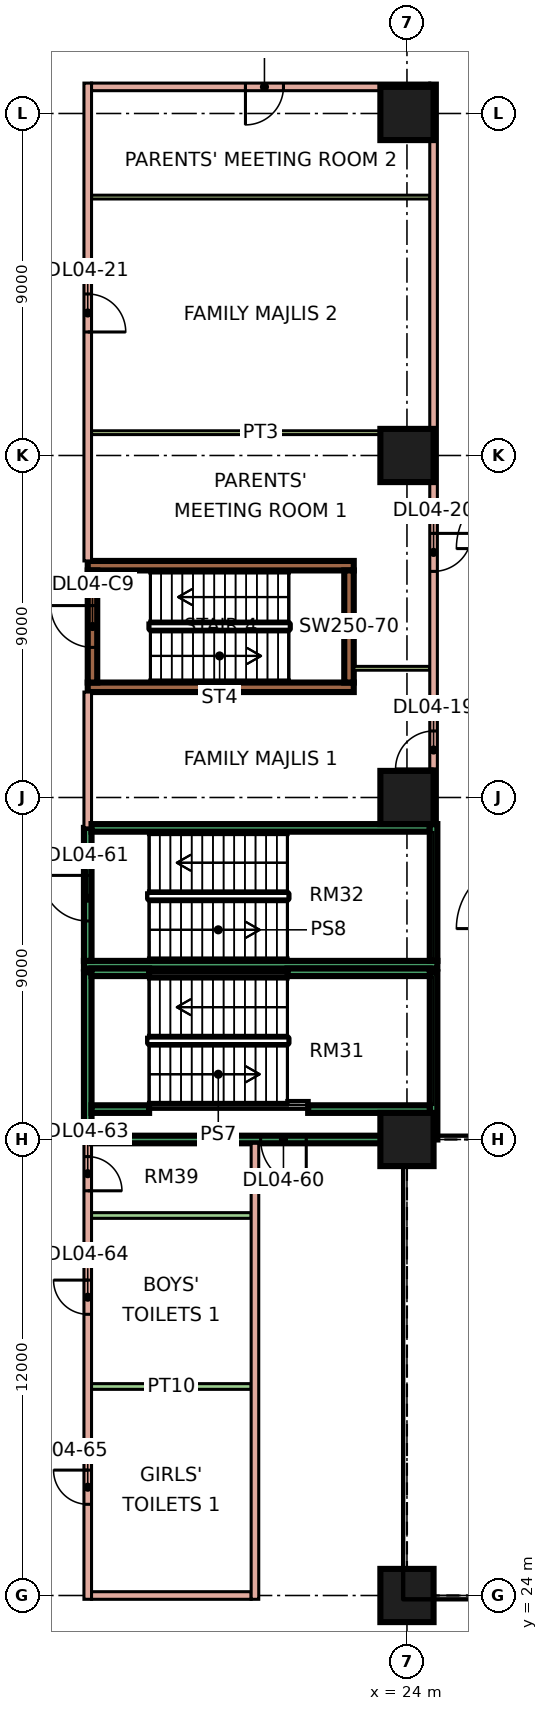
"""IFC4 building model, lengths in metres.
Left out: names, types, materials, properties, quantities, classifications, styles, units other than length and angle.
Written with IfcOpenShell. Run it as: python <this file> out.ifc"""

import sys

from ifc_helpers import new_model, si_unit, direction, frame, frame_2d, origin, origin_2d, place, context, subcontext, project, spatial, rectangle, extrude, element, fill, save


model = new_model("IFC4")
c1 = context("Model", 3, precision=1e-05, world=origin(), true_north=direction((0.0, 1.0)))
c2 = subcontext(c1, "Body", "Model", "MODEL_VIEW")
j1 = project(units=[si_unit("LENGTHUNIT", "METRE"), si_unit("PLANEANGLEUNIT", "RADIAN")], contexts=[c1])
p1 = place(None, origin())
s1 = spatial("IfcSite", under=j1, at=p1, CompositionType="ELEMENT")
p2 = place(p1, origin())
s2 = spatial("IfcBuilding", under=s1, at=p2, CompositionType="ELEMENT")
p3 = place(p2, frame((0.0, 0.0, 21.6)))
s3 = spatial("IfcBuildingStorey", under=s2, at=p3, CompositionType="ELEMENT", Elevation=21.6)
for number, where, z_axis, x_axis in (
    (1, (24.0, 24.0, 0.0), (0.0, 0.0, 1.0), (1.0, 0.0, 0.0)),
    (2, (24.0, 36.0, 0.0), (0.0, 0.0, 1.0), (1.0, 0.0, 0.0)),
    (3, (24.0, 45.0, 0.0), (0.0, 0.0, 1.0), (1.0, 0.0, 0.0)),
    (4, (24.0, 54.0, 0.0), (0.0, 0.0, 1.0), (1.0, 0.0, 0.0)),
    (5, (24.0, 63.0, 0.0), (0.0, 0.0, 1.0), (1.0, 0.0, 0.0)),
):
    element("IfcColumn", number, at=place(p3, frame(where, z_axis=z_axis, x_axis=x_axis)), inside=s3, PredefinedType="COLUMN", context=c2, shape_type="SweptSolid", body=[
        extrude(rectangle(XDim=1.4, YDim=1.4, at=origin_2d()), origin(), (0.0, 0.0, 1.0), 4.8),
    ])
for number, where, z_axis, x_axis in (
    (6, (15.6, 47.9, 0.0), (0.0, 0.0, 1.0), (1.0, 0.0, 0.0)),
    (7, (15.6, 51.1, 0.0), (0.0, 0.0, 1.0), (1.0, 0.0, 0.0)),
):
    element("IfcWall", number, at=place(p3, frame(where, z_axis=z_axis, x_axis=x_axis)), inside=s3, PredefinedType="SHEAR", context=c2, shape_type="SweptSolid", body=[
        extrude(rectangle(XDim=7.0, YDim=0.25, at=frame_2d((3.5, 0.0))), origin(), (0.0, 0.0, 1.0), 4.8),
    ])
p4 = place(p3, frame((15.725, 48.025, 0.0), z_axis=(0.0, 0.0, 1.0), x_axis=(0.0, 1.0, 0.0)))
e8 = element("IfcWall", 8, at=p4, inside=s3, PredefinedType="SHEAR", context=c2, shape_type="SweptSolid", body=[
    extrude(rectangle(XDim=2.95, YDim=0.25, at=frame_2d((1.475, 0.0))), origin(), (0.0, 0.0, 1.0), 4.8),
])
p5 = place(p4, frame((0.925, 0.0, 0.0)))
e9 = element("IfcOpeningElement", 9, at=p5, cuts=e8, PredefinedType="OPENING", context=c2, shape_type="SweptSolid", body=[
    extrude(rectangle(XDim=1.1, YDim=2.2, at=frame_2d((0.55, 1.1))), frame((0.0, 0.135, 0.0), z_axis=(0.0, -1.0, 0.0), x_axis=(1.0, 0.0, 0.0)), (0.0, 0.0, 1.0), 0.27),
])
p6 = place(p3, frame((22.475, 48.025, 0.0), z_axis=(0.0, 0.0, 1.0), x_axis=(0.0, 1.0, 0.0)))
e10 = element("IfcWall", 10, at=p6, inside=s3, PredefinedType="SHEAR", context=c2, shape_type="SweptSolid", body=[
    extrude(rectangle(XDim=2.95, YDim=0.25, at=frame_2d((1.475, 0.0))), origin(), (0.0, 0.0, 1.0), 4.8),
])
p7 = place(p3, frame((25.068, 70.7, 0.0), z_axis=(0.0, 0.0, 1.0), x_axis=(0.707106781187, -0.707106781187, 0.0)))
e11 = element("IfcWall", 11, at=p7, inside=s3, PredefinedType="PARAPET", context=c2, shape_type="SweptSolid", body=[
    extrude(rectangle(XDim=9.379, YDim=0.2, at=frame_2d((4.689, 0.0))), origin(), (0.0, 0.0, 1.0), 0.5),
])
p8 = place(p3, frame((15.5, 40.6, 0.0), z_axis=(0.0, 0.0, 1.0), x_axis=(1.0, 0.0, 0.0)))
e12 = element("IfcWall", 12, at=p8, inside=s3, PredefinedType="SOLIDWALL", context=c2, shape_type="SweptSolid", body=[
    extrude(rectangle(XDim=9.3, YDim=0.2, at=frame_2d((4.65, 0.0))), origin(), (0.0, 0.0, 1.0), 4.4),
])
p9 = place(p3, frame((15.6, 23.9, 0.0), z_axis=(0.0, 0.0, 1.0), x_axis=(0.0, 1.0, 0.0)))
e13 = element("IfcWall", 13, at=p9, inside=s3, PredefinedType="PARTITIONING", context=c2, shape_type="SweptSolid", body=[
    extrude(rectangle(XDim=12.1, YDim=0.2, at=frame_2d((6.05, 0.0))), origin(), (0.0, 0.0, 1.0), 4.4),
])
p10 = place(p9, frame((10.75, 0.0, 0.0)))
e14 = element("IfcOpeningElement", 14, at=p10, cuts=e13, PredefinedType="OPENING", context=c2, shape_type="SweptSolid", body=[
    extrude(rectangle(XDim=0.9, YDim=2.1, at=frame_2d((0.45, 1.05))), frame((0.0, 0.11, 0.0), z_axis=(0.0, -1.0, 0.0), x_axis=(1.0, 0.0, 0.0)), (0.0, 0.0, 1.0), 0.22),
])
p11 = place(p9, frame((7.5, 0.0, 0.0)))
e15 = element("IfcOpeningElement", 15, at=p11, cuts=e13, PredefinedType="OPENING", context=c2, shape_type="SweptSolid", body=[
    extrude(rectangle(XDim=0.9, YDim=2.1, at=frame_2d((0.45, 1.05))), frame((0.0, 0.11, 0.0), z_axis=(0.0, -1.0, 0.0), x_axis=(1.0, 0.0, 0.0)), (0.0, 0.0, 1.0), 0.22),
])
p12 = place(p9, frame((2.5, 0.0, 0.0)))
e16 = element("IfcOpeningElement", 16, at=p12, cuts=e13, PredefinedType="OPENING", context=c2, shape_type="SweptSolid", body=[
    extrude(rectangle(XDim=0.9, YDim=2.1, at=frame_2d((0.45, 1.05))), frame((0.0, 0.11, 0.0), z_axis=(0.0, -1.0, 0.0), x_axis=(1.0, 0.0, 0.0)), (0.0, 0.0, 1.0), 0.22),
])
p13 = place(p3, frame((15.6, 36.0, 0.0), z_axis=(0.0, 0.0, 1.0), x_axis=(0.0, 1.0, 0.0)))
e17 = element("IfcWall", 17, at=p13, inside=s3, PredefinedType="SOLIDWALL", context=c2, shape_type="SweptSolid", body=[
    extrude(rectangle(XDim=4.4, YDim=0.2, at=frame_2d((2.2, 0.0))), origin(), (0.0, 0.0, 1.0), 4.4),
])
p14 = place(p3, frame((15.6, 40.7, 0.0), z_axis=(0.0, 0.0, 1.0), x_axis=(0.0, 1.0, 0.0)))
e18 = element("IfcWall", 18, at=p14, inside=s3, PredefinedType="SOLIDWALL", context=c2, shape_type="SweptSolid", body=[
    extrude(rectangle(XDim=3.5, YDim=0.2, at=frame_2d((1.75, 0.0))), origin(), (0.0, 0.0, 1.0), 4.4),
])
p15 = place(p14, frame((1.05, 0.0, 0.0)))
e19 = element("IfcOpeningElement", 19, at=p15, cuts=e18, PredefinedType="OPENING", context=c2, shape_type="SweptSolid", body=[
    extrude(rectangle(XDim=1.2, YDim=2.1, at=frame_2d((0.6, 1.05))), frame((0.0, 0.11, 0.0), z_axis=(0.0, -1.0, 0.0), x_axis=(1.0, 0.0, 0.0)), (0.0, 0.0, 1.0), 0.22),
])
p16 = place(p3, frame((15.6, 44.2, 0.0), z_axis=(0.0, 0.0, 1.0), x_axis=(0.0, 1.0, 0.0)))
e20 = element("IfcWall", 20, at=p16, inside=s3, PredefinedType="PARTITIONING", context=c2, shape_type="SweptSolid", body=[
    extrude(rectangle(XDim=3.575, YDim=0.2, at=frame_2d((1.788, 0.0))), origin(), (0.0, 0.0, 1.0), 4.4),
])
p17 = place(p3, frame((15.6, 51.225, 0.0), z_axis=(0.0, 0.0, 1.0), x_axis=(0.0, 1.0, 0.0)))
e21 = element("IfcWall", 21, at=p17, inside=s3, PredefinedType="PARTITIONING", context=c2, shape_type="SweptSolid", body=[
    extrude(rectangle(XDim=12.575, YDim=0.2, at=frame_2d((6.288, 0.0))), origin(), (0.0, 0.0, 1.0), 4.4),
])
p18 = place(p17, frame((6.025, 0.0, 0.0)))
e22 = element("IfcOpeningElement", 22, at=p18, cuts=e21, PredefinedType="OPENING", context=c2, shape_type="SweptSolid", body=[
    extrude(rectangle(XDim=1.0, YDim=2.1, at=frame_2d((0.5, 1.05))), frame((0.0, 0.11, 0.0), z_axis=(0.0, -1.0, 0.0), x_axis=(1.0, 0.0, 0.0)), (0.0, 0.0, 1.0), 0.22),
])
p19 = place(p3, frame((15.7, 24.0, 0.0), z_axis=(0.0, 0.0, 1.0), x_axis=(1.0, 0.0, 0.0)))
e23 = element("IfcWall", 23, at=p19, inside=s3, PredefinedType="PARTITIONING", context=c2, shape_type="SweptSolid", body=[
    extrude(rectangle(XDim=4.2, YDim=0.2, at=frame_2d((2.1, 0.0))), origin(), (0.0, 0.0, 1.0), 4.4),
])
for number, where, z_axis, x_axis in (
    (24, (15.7, 29.5, 0.0), (0.0, 0.0, 1.0), (1.0, 0.0, 0.0)),
    (25, (15.7, 34.0, 0.0), (0.0, 0.0, 1.0), (1.0, 0.0, 0.0)),
):
    element("IfcWall", number, at=place(p3, frame(where, z_axis=z_axis, x_axis=x_axis)), inside=s3, PredefinedType="PARTITIONING", context=c2, shape_type="SweptSolid", body=[
        extrude(rectangle(XDim=4.2, YDim=0.15, at=frame_2d((2.1, 0.0))), origin(), (0.0, 0.0, 1.0), 4.4),
    ])
p20 = place(p3, frame((15.7, 36.0, 0.0), z_axis=(0.0, 0.0, 1.0), x_axis=(1.0, 0.0, 0.0)))
e26 = element("IfcWall", 26, at=p20, inside=s3, PredefinedType="SOLIDWALL", context=c2, shape_type="SweptSolid", body=[
    extrude(rectangle(XDim=8.3, YDim=0.2, at=frame_2d((4.15, 0.0))), origin(), (0.0, 0.0, 1.0), 4.4),
])
p21 = place(p20, frame((4.45, 0.0, 0.0)))
e27 = element("IfcOpeningElement", 27, at=p21, cuts=e26, PredefinedType="OPENING", context=c2, shape_type="SweptSolid", body=[
    extrude(rectangle(XDim=1.2, YDim=2.1, at=frame_2d((0.6, 1.05))), frame((0.0, 0.11, 0.0), z_axis=(0.0, -1.0, 0.0), x_axis=(1.0, 0.0, 0.0)), (0.0, 0.0, 1.0), 0.22),
])
p22 = place(p3, frame((15.7, 44.2, 0.0), z_axis=(0.0, 0.0, 1.0), x_axis=(1.0, 0.0, 0.0)))
e28 = element("IfcWall", 28, at=p22, inside=s3, PredefinedType="SOLIDWALL", context=c2, shape_type="SweptSolid", body=[
    extrude(rectangle(XDim=8.9, YDim=0.2, at=frame_2d((4.45, 0.0))), origin(), (0.0, 0.0, 1.0), 4.4),
])
for number, where, z_axis, x_axis in (
    (29, (15.7, 54.6, 0.0), (0.0, 0.0, 1.0), (1.0, 0.0, 0.0)),
    (30, (15.7, 60.8, 0.0), (0.0, 0.0, 1.0), (1.0, 0.0, 0.0)),
):
    element("IfcWall", number, at=place(p3, frame(where, z_axis=z_axis, x_axis=x_axis)), inside=s3, PredefinedType="PARTITIONING", context=c2, shape_type="SweptSolid", body=[
        extrude(rectangle(XDim=8.9, YDim=0.1, at=frame_2d((4.45, 0.0))), origin(), (0.0, 0.0, 1.0), 4.4),
    ])
p23 = place(p3, frame((15.7, 63.7, 0.0), z_axis=(0.0, 0.0, 1.0), x_axis=(1.0, 0.0, 0.0)))
e31 = element("IfcWall", 31, at=p23, inside=s3, PredefinedType="PARTITIONING", context=c2, shape_type="SweptSolid", body=[
    extrude(rectangle(XDim=8.9, YDim=0.2, at=frame_2d((4.45, 0.0))), origin(), (0.0, 0.0, 1.0), 4.4),
])
p24 = place(p23, frame((4.05, 0.0, 0.0)))
e32 = element("IfcOpeningElement", 32, at=p24, cuts=e31, PredefinedType="OPENING", context=c2, shape_type="SweptSolid", body=[
    extrude(rectangle(XDim=1.0, YDim=2.1, at=frame_2d((0.5, 1.05))), frame((0.0, 0.11, 0.0), z_axis=(0.0, -1.0, 0.0), x_axis=(1.0, 0.0, 0.0)), (0.0, 0.0, 1.0), 0.22),
])
p25 = place(p3, frame((20.0, 23.9, 0.0), z_axis=(0.0, 0.0, 1.0), x_axis=(0.0, 1.0, 0.0)))
e33 = element("IfcWall", 33, at=p25, inside=s3, PredefinedType="PARTITIONING", context=c2, shape_type="SweptSolid", body=[
    extrude(rectangle(XDim=12.0, YDim=0.2, at=frame_2d((6.0, 0.0))), origin(), (0.0, 0.0, 1.0), 4.4),
])
p26 = place(p3, frame((22.6, 48.4, 0.0), z_axis=(0.0, 0.0, 1.0), x_axis=(1.0, 0.0, 0.0)))
e34 = element("IfcWall", 34, at=p26, inside=s3, PredefinedType="PARTITIONING", context=c2, shape_type="SweptSolid", body=[
    extrude(rectangle(XDim=2.0, YDim=0.1, at=frame_2d((1.0, 0.0))), origin(), (0.0, 0.0, 1.0), 4.4),
])
p27 = place(p3, frame((24.7, 36.0, 0.0), z_axis=(0.0, 0.0, 1.0), x_axis=(0.0, 1.0, 0.0)))
e35 = element("IfcWall", 35, at=p27, inside=s3, PredefinedType="SOLIDWALL", context=c2, shape_type="SweptSolid", body=[
    extrude(rectangle(XDim=4.4, YDim=0.2, at=frame_2d((2.2, 0.0))), origin(), (0.0, 0.0, 1.0), 4.4),
])
p28 = place(p3, frame((24.7, 40.7, 0.0), z_axis=(0.0, 0.0, 1.0), x_axis=(0.0, 1.0, 0.0)))
e36 = element("IfcWall", 36, at=p28, inside=s3, PredefinedType="SOLIDWALL", context=c2, shape_type="SweptSolid", body=[
    extrude(rectangle(XDim=3.6, YDim=0.2, at=frame_2d((1.8, 0.0))), origin(), (0.0, 0.0, 1.0), 4.4),
])
p29 = place(p3, frame((24.7, 44.3, 0.0), z_axis=(0.0, 0.0, 1.0), x_axis=(0.0, 1.0, 0.0)))
e37 = element("IfcWall", 37, at=p29, inside=s3, PredefinedType="PARTITIONING", context=c2, shape_type="SweptSolid", body=[
    extrude(rectangle(XDim=19.5, YDim=0.2, at=frame_2d((9.75, 0.0))), origin(), (0.0, 0.0, 1.0), 4.4),
])
p30 = place(p29, frame((1.45, 0.0, 0.0)))
e38 = element("IfcOpeningElement", 38, at=p30, cuts=e37, PredefinedType="OPENING", context=c2, shape_type="SweptSolid", body=[
    extrude(rectangle(XDim=1.0, YDim=2.1, at=frame_2d((0.5, 1.05))), frame((0.0, 0.11, 0.0), z_axis=(0.0, -1.0, 0.0), x_axis=(1.0, 0.0, 0.0)), (0.0, 0.0, 1.0), 0.22),
])
p31 = place(p29, frame((6.65, 0.0, 0.0)))
e39 = element("IfcOpeningElement", 39, at=p31, cuts=e37, PredefinedType="OPENING", context=c2, shape_type="SweptSolid", body=[
    extrude(rectangle(XDim=1.0, YDim=2.1, at=frame_2d((0.5, 1.05))), frame((0.0, 0.11, 0.0), z_axis=(0.0, -1.0, 0.0), x_axis=(1.0, 0.0, 0.0)), (0.0, 0.0, 1.0), 0.22),
])
p32 = place(p3, frame((21.4, 36.8, 0.0), z_axis=(0.0, 0.0, 1.0), x_axis=(1.0, 0.0, 0.0)))
e40 = element("IfcWall", 40, at=p32, inside=s3, PredefinedType="SOLIDWALL", context=c2, shape_type="SweptSolid", body=[
    extrude(rectangle(XDim=3.2, YDim=0.2, at=frame_2d((1.6, 0.0))), origin(), (0.0, 0.0, 1.0), 4.4),
])
p33 = place(p3, frame((20.855, 40.4, 0.0), z_axis=(0.0, 0.0, 1.0), x_axis=(1.0, 0.0, 0.0)))
e41 = element("IfcWall", 41, at=p33, inside=s3, PredefinedType="SOLIDWALL", context=c2, shape_type="SweptSolid", body=[
    extrude(rectangle(XDim=3.745, YDim=0.2, at=frame_2d((1.873, 0.0))), origin(), (0.0, 0.0, 1.0), 4.4),
])
for number, where, z_axis, x_axis in (
    (42, (15.7, 36.8, 0.0), (0.0, 0.0, 1.0), (1.0, 0.0, 0.0)),
    (43, (15.7, 40.4, 0.0), (0.0, 0.0, 1.0), (1.0, 0.0, 0.0)),
):
    element("IfcWall", number, at=place(p3, frame(where, z_axis=z_axis, x_axis=x_axis)), inside=s3, PredefinedType="SOLIDWALL", context=c2, shape_type="SweptSolid", body=[
        extrude(rectangle(XDim=1.515, YDim=0.2, at=frame_2d((0.758, 0.0))), origin(), (0.0, 0.0, 1.0), 4.4),
    ])
p34 = place(p5, frame((1.1, 0.0, 0.0), z_axis=(0.0, 0.0, 1.0), x_axis=(-1.0, 0.0, 0.0)))
e44 = element("IfcDoor", 44, at=p34, inside=s3, OperationType="SINGLE_SWING_RIGHT", PredefinedType="DOOR", context=c2, shape_type="SweptSolid", body=[
    extrude(rectangle(XDim=1.1, YDim=2.2, at=frame_2d((0.55, 1.1))), frame((0.0, 0.025, 0.0), z_axis=(0.0, -1.0, 0.0), x_axis=(1.0, 0.0, 0.0)), (0.0, 0.0, 1.0), 0.05),
])
fill(e9, e44)
p35 = place(p30, origin())
e45 = element("IfcDoor", 45, at=p35, inside=s3, OperationType="SINGLE_SWING_LEFT", PredefinedType="DOOR", context=c2, shape_type="SweptSolid", body=[
    extrude(rectangle(XDim=1.0, YDim=2.1, at=frame_2d((0.5, 1.05))), frame((0.0, 0.025, 0.0), z_axis=(0.0, -1.0, 0.0), x_axis=(1.0, 0.0, 0.0)), (0.0, 0.0, 1.0), 0.05),
])
fill(e38, e45)
p36 = place(p31, origin())
e46 = element("IfcDoor", 46, at=p36, inside=s3, OperationType="SINGLE_SWING_RIGHT", PredefinedType="DOOR", context=c2, shape_type="SweptSolid", body=[
    extrude(rectangle(XDim=1.0, YDim=2.1, at=frame_2d((0.5, 1.05))), frame((0.0, 0.025, 0.0), z_axis=(0.0, -1.0, 0.0), x_axis=(1.0, 0.0, 0.0)), (0.0, 0.0, 1.0), 0.05),
])
fill(e39, e46)
p37 = place(p18, frame((1.0, 0.0, 0.0), z_axis=(0.0, 0.0, 1.0), x_axis=(-1.0, 0.0, 0.0)))
e47 = element("IfcDoor", 47, at=p37, inside=s3, OperationType="SINGLE_SWING_LEFT", PredefinedType="DOOR", context=c2, shape_type="SweptSolid", body=[
    extrude(rectangle(XDim=1.0, YDim=2.1, at=frame_2d((0.5, 1.05))), frame((0.0, 0.025, 0.0), z_axis=(0.0, -1.0, 0.0), x_axis=(1.0, 0.0, 0.0)), (0.0, 0.0, 1.0), 0.05),
])
fill(e22, e47)
p38 = place(p24, frame((1.0, 0.0, 0.0), z_axis=(0.0, 0.0, 1.0), x_axis=(-1.0, 0.0, 0.0)))
e48 = element("IfcDoor", 48, at=p38, inside=s3, OperationType="SINGLE_SWING_LEFT", PredefinedType="DOOR", context=c2, shape_type="SweptSolid", body=[
    extrude(rectangle(XDim=1.0, YDim=2.1, at=frame_2d((0.5, 1.05))), frame((0.0, 0.025, 0.0), z_axis=(0.0, -1.0, 0.0), x_axis=(1.0, 0.0, 0.0)), (0.0, 0.0, 1.0), 0.05),
])
fill(e32, e48)
p39 = place(p21, origin())
e49 = element("IfcDoor", 49, at=p39, inside=s3, OperationType="SINGLE_SWING_RIGHT", PredefinedType="DOOR", context=c2, shape_type="SweptSolid", body=[
    extrude(rectangle(XDim=1.2, YDim=2.1, at=frame_2d((0.6, 1.05))), frame((0.0, 0.025, 0.0), z_axis=(0.0, -1.0, 0.0), x_axis=(1.0, 0.0, 0.0)), (0.0, 0.0, 1.0), 0.05),
])
fill(e27, e49)
p40 = place(p15, frame((1.2, 0.0, 0.0), z_axis=(0.0, 0.0, 1.0), x_axis=(-1.0, 0.0, 0.0)))
e50 = element("IfcDoor", 50, at=p40, inside=s3, OperationType="SINGLE_SWING_RIGHT", PredefinedType="DOOR", context=c2, shape_type="SweptSolid", body=[
    extrude(rectangle(XDim=1.2, YDim=2.1, at=frame_2d((0.6, 1.05))), frame((0.0, 0.025, 0.0), z_axis=(0.0, -1.0, 0.0), x_axis=(1.0, 0.0, 0.0)), (0.0, 0.0, 1.0), 0.05),
])
fill(e19, e50)
p41 = place(p10, frame((0.9, 0.0, 0.0), z_axis=(0.0, 0.0, 1.0), x_axis=(-1.0, 0.0, 0.0)))
e51 = element("IfcDoor", 51, at=p41, inside=s3, OperationType="SINGLE_SWING_LEFT", PredefinedType="DOOR", context=c2, shape_type="SweptSolid", body=[
    extrude(rectangle(XDim=0.9, YDim=2.1, at=frame_2d((0.45, 1.05))), frame((0.0, 0.025, 0.0), z_axis=(0.0, -1.0, 0.0), x_axis=(1.0, 0.0, 0.0)), (0.0, 0.0, 1.0), 0.05),
])
fill(e14, e51)
p42 = place(p11, frame((0.9, 0.0, 0.0), z_axis=(0.0, 0.0, 1.0), x_axis=(-1.0, 0.0, 0.0)))
e52 = element("IfcDoor", 52, at=p42, inside=s3, OperationType="SINGLE_SWING_RIGHT", PredefinedType="DOOR", context=c2, shape_type="SweptSolid", body=[
    extrude(rectangle(XDim=0.9, YDim=2.1, at=frame_2d((0.45, 1.05))), frame((0.0, 0.025, 0.0), z_axis=(0.0, -1.0, 0.0), x_axis=(1.0, 0.0, 0.0)), (0.0, 0.0, 1.0), 0.05),
])
fill(e15, e52)
p43 = place(p12, frame((0.9, 0.0, 0.0), z_axis=(0.0, 0.0, 1.0), x_axis=(-1.0, 0.0, 0.0)))
e53 = element("IfcDoor", 53, at=p43, inside=s3, OperationType="SINGLE_SWING_RIGHT", PredefinedType="DOOR", context=c2, shape_type="SweptSolid", body=[
    extrude(rectangle(XDim=0.9, YDim=2.1, at=frame_2d((0.45, 1.05))), frame((0.0, 0.025, 0.0), z_axis=(0.0, -1.0, 0.0), x_axis=(1.0, 0.0, 0.0)), (0.0, 0.0, 1.0), 0.05),
])
fill(e16, e53)
save(model, sys.argv[1])
